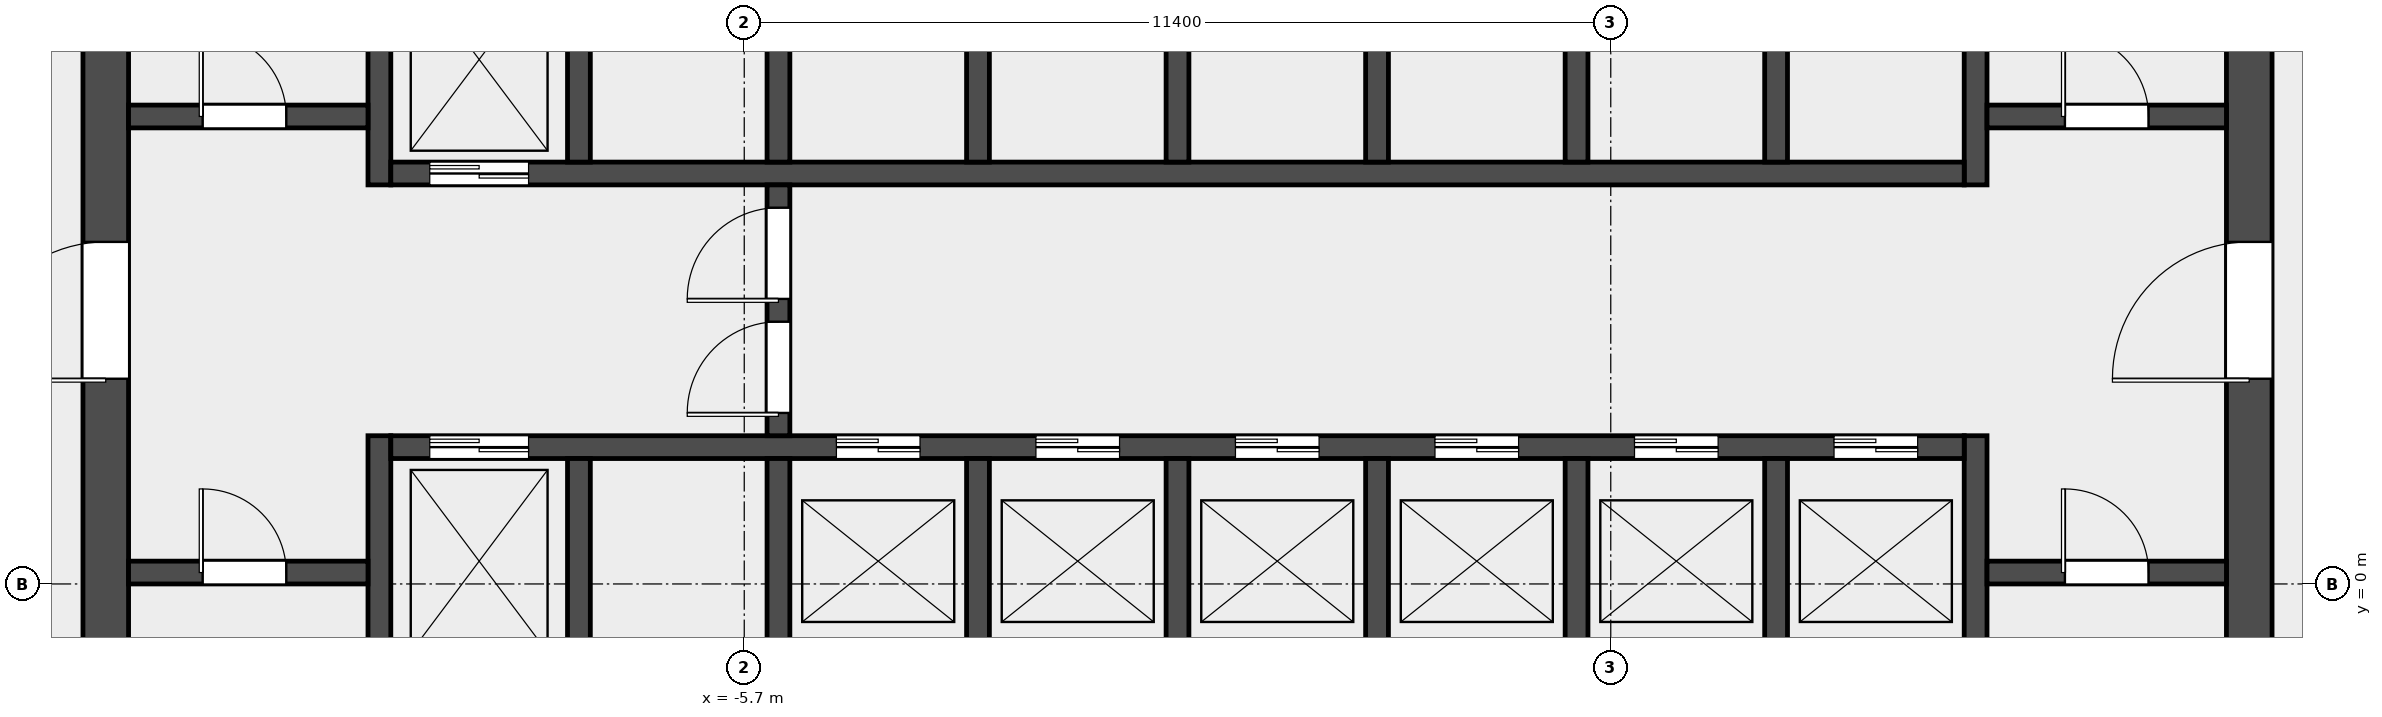
"""IFC4 building model, lengths in metres.
Left out: names, types, materials, properties, quantities, classifications, styles, units other than length and angle.
Written with IfcOpenShell. Run it as: python <this file> out.ifc"""

import sys

from ifc_helpers import new_model, si_unit, direction, frame, frame_2d, origin, place, context, subcontext, project, spatial, rectangle, extrude, element, fill, save


model = new_model("IFC4")
c1 = context("Model", 3, precision=1e-05, world=origin(), true_north=direction((0.0, 1.0)))
c2 = subcontext(c1, "Body", "Model", "MODEL_VIEW")
j1 = project(units=[si_unit("LENGTHUNIT", "METRE"), si_unit("PLANEANGLEUNIT", "RADIAN")], contexts=[c1])
p1 = place(None, origin())
s1 = spatial("IfcSite", under=j1, at=p1, CompositionType="ELEMENT")
p2 = place(p1, origin())
s2 = spatial("IfcBuilding", under=s1, at=p2, CompositionType="ELEMENT")
p3 = place(p2, frame((0.0, 0.0, 161.0)))
s3 = spatial("IfcBuildingStorey", under=s2, at=p3, CompositionType="ELEMENT", Elevation=161.0)
p4 = place(p3, frame((-14.1, -6.6, 0.0), z_axis=(0.0, 0.0, 1.0), x_axis=(0.0, 1.0, 0.0)))
e1 = element("IfcWall", 1, at=p4, inside=s3, PredefinedType="SHEAR", context=c2, shape_type="SweptSolid", body=[
    extrude(rectangle(XDim=19.5, YDim=0.6, at=frame_2d((9.75, 0.0))), origin(), (0.0, 0.0, 1.0), 3.7),
])
p5 = place(p4, frame((9.3, 0.0, 0.0)))
e2 = element("IfcOpeningElement", 2, at=p5, cuts=e1, PredefinedType="OPENING", context=c2, shape_type="SweptSolid", body=[
    extrude(rectangle(XDim=1.8, YDim=2.1, at=frame_2d((0.9, 1.05))), frame((0.0, 0.312, 0.0), z_axis=(0.0, -1.0, 0.0), x_axis=(1.0, 0.0, 0.0)), (0.0, 0.0, 1.0), 0.624),
])
p6 = place(p3, frame((14.1, -6.6, 0.0), z_axis=(0.0, 0.0, 1.0), x_axis=(0.0, 1.0, 0.0)))
e3 = element("IfcWall", 3, at=p6, inside=s3, PredefinedType="SHEAR", context=c2, shape_type="SweptSolid", body=[
    extrude(rectangle(XDim=19.5, YDim=0.6, at=frame_2d((9.75, 0.0))), origin(), (0.0, 0.0, 1.0), 3.7),
])
p7 = place(p6, frame((9.3, 0.0, 0.0)))
e4 = element("IfcOpeningElement", 4, at=p7, cuts=e3, PredefinedType="OPENING", context=c2, shape_type="SweptSolid", body=[
    extrude(rectangle(XDim=1.8, YDim=2.1, at=frame_2d((0.9, 1.05))), frame((0.0, 0.312, 0.0), z_axis=(0.0, -1.0, 0.0), x_axis=(1.0, 0.0, 0.0)), (0.0, 0.0, 1.0), 0.624),
])
p8 = place(p3, frame((-10.5, -6.6, 0.0), z_axis=(0.0, 0.0, 1.0), x_axis=(0.0, 1.0, 0.0)))
e5 = element("IfcWall", 5, at=p8, inside=s3, PredefinedType="SHEAR", context=c2, shape_type="SweptSolid", body=[
    extrude(rectangle(XDim=8.55, YDim=0.3, at=frame_2d((4.275, 0.0))), origin(), (0.0, 0.0, 1.0), 3.7),
])
p9 = place(p3, frame((-10.5, 5.25, 0.0), z_axis=(0.0, 0.0, 1.0), x_axis=(0.0, 1.0, 0.0)))
e6 = element("IfcWall", 6, at=p9, inside=s3, PredefinedType="SHEAR", context=c2, shape_type="SweptSolid", body=[
    extrude(rectangle(XDim=7.65, YDim=0.3, at=frame_2d((3.825, 0.0))), origin(), (0.0, 0.0, 1.0), 3.7),
])
p10 = place(p3, frame((10.5, -6.6, 0.0), z_axis=(0.0, 0.0, 1.0), x_axis=(0.0, 1.0, 0.0)))
e7 = element("IfcWall", 7, at=p10, inside=s3, PredefinedType="SHEAR", context=c2, shape_type="SweptSolid", body=[
    extrude(rectangle(XDim=8.55, YDim=0.3, at=frame_2d((4.275, 0.0))), origin(), (0.0, 0.0, 1.0), 3.7),
])
p11 = place(p3, frame((10.5, 5.25, 0.0), z_axis=(0.0, 0.0, 1.0), x_axis=(0.0, 1.0, 0.0)))
e8 = element("IfcWall", 8, at=p11, inside=s3, PredefinedType="SHEAR", context=c2, shape_type="SweptSolid", body=[
    extrude(rectangle(XDim=7.65, YDim=0.3, at=frame_2d((3.825, 0.0))), origin(), (0.0, 0.0, 1.0), 3.7),
])
p12 = place(p3, frame((-13.8, 0.15, 0.0), z_axis=(0.0, 0.0, 1.0), x_axis=(1.0, 0.0, 0.0)))
e9 = element("IfcWall", 9, at=p12, inside=s3, PredefinedType="SOLIDWALL", context=c2, shape_type="SweptSolid", body=[
    extrude(rectangle(XDim=3.15, YDim=0.3, at=frame_2d((1.575, 0.0))), origin(), (0.0, 0.0, 1.0), 3.7),
])
p13 = place(p12, frame((0.975, 0.0, 0.0)))
e10 = element("IfcOpeningElement", 10, at=p13, cuts=e9, PredefinedType="OPENING", context=c2, shape_type="SweptSolid", body=[
    extrude(rectangle(XDim=1.1, YDim=2.1, at=frame_2d((0.55, 1.05))), frame((0.0, 0.162, 0.0), z_axis=(0.0, -1.0, 0.0), x_axis=(1.0, 0.0, 0.0)), (0.0, 0.0, 1.0), 0.324),
])
p14 = place(p3, frame((-13.8, 6.15, 0.0), z_axis=(0.0, 0.0, 1.0), x_axis=(1.0, 0.0, 0.0)))
e11 = element("IfcWall", 11, at=p14, inside=s3, PredefinedType="SOLIDWALL", context=c2, shape_type="SweptSolid", body=[
    extrude(rectangle(XDim=3.15, YDim=0.3, at=frame_2d((1.575, 0.0))), origin(), (0.0, 0.0, 1.0), 3.7),
])
p15 = place(p14, frame((0.975, 0.0, 0.0)))
e12 = element("IfcOpeningElement", 12, at=p15, cuts=e11, PredefinedType="OPENING", context=c2, shape_type="SweptSolid", body=[
    extrude(rectangle(XDim=1.1, YDim=2.1, at=frame_2d((0.55, 1.05))), frame((0.0, 0.162, 0.0), z_axis=(0.0, -1.0, 0.0), x_axis=(1.0, 0.0, 0.0)), (0.0, 0.0, 1.0), 0.324),
])
p16 = place(p3, frame((10.65, 0.15, 0.0), z_axis=(0.0, 0.0, 1.0), x_axis=(1.0, 0.0, 0.0)))
e13 = element("IfcWall", 13, at=p16, inside=s3, PredefinedType="SOLIDWALL", context=c2, shape_type="SweptSolid", body=[
    extrude(rectangle(XDim=3.15, YDim=0.3, at=frame_2d((1.575, 0.0))), origin(), (0.0, 0.0, 1.0), 3.7),
])
p17 = place(p16, frame((1.025, 0.0, 0.0)))
e14 = element("IfcOpeningElement", 14, at=p17, cuts=e13, PredefinedType="OPENING", context=c2, shape_type="SweptSolid", body=[
    extrude(rectangle(XDim=1.1, YDim=2.1, at=frame_2d((0.55, 1.05))), frame((0.0, 0.162, 0.0), z_axis=(0.0, -1.0, 0.0), x_axis=(1.0, 0.0, 0.0)), (0.0, 0.0, 1.0), 0.324),
])
p18 = place(p3, frame((10.65, 6.15, 0.0), z_axis=(0.0, 0.0, 1.0), x_axis=(1.0, 0.0, 0.0)))
e15 = element("IfcWall", 15, at=p18, inside=s3, PredefinedType="SOLIDWALL", context=c2, shape_type="SweptSolid", body=[
    extrude(rectangle(XDim=3.15, YDim=0.3, at=frame_2d((1.575, 0.0))), origin(), (0.0, 0.0, 1.0), 3.7),
])
p19 = place(p18, frame((1.025, 0.0, 0.0)))
e16 = element("IfcOpeningElement", 16, at=p19, cuts=e15, PredefinedType="OPENING", context=c2, shape_type="SweptSolid", body=[
    extrude(rectangle(XDim=1.1, YDim=2.1, at=frame_2d((0.55, 1.05))), frame((0.0, 0.162, 0.0), z_axis=(0.0, -1.0, 0.0), x_axis=(1.0, 0.0, 0.0)), (0.0, 0.0, 1.0), 0.324),
])
p20 = place(p3, frame((-10.35, 1.8, 0.0), z_axis=(0.0, 0.0, 1.0), x_axis=(1.0, 0.0, 0.0)))
e17 = element("IfcWall", 17, at=p20, inside=s3, PredefinedType="SOLIDWALL", context=c2, shape_type="SweptSolid", body=[
    extrude(rectangle(XDim=20.7, YDim=0.3, at=frame_2d((10.35, 0.0))), origin(), (0.0, 0.0, 1.0), 3.7),
])
p21 = place(p20, frame((0.512, 0.0, 0.0)))
e18 = element("IfcOpeningElement", 18, at=p21, cuts=e17, PredefinedType="OPENING", context=c2, shape_type="SweptSolid", body=[
    extrude(rectangle(XDim=1.3, YDim=2.1, at=frame_2d((0.65, 1.05))), frame((0.0, 0.162, 0.0), z_axis=(0.0, -1.0, 0.0), x_axis=(1.0, 0.0, 0.0)), (0.0, 0.0, 1.0), 0.324),
])
p22 = place(p20, frame((5.863, 0.0, 0.0)))
e19 = element("IfcOpeningElement", 19, at=p22, cuts=e17, PredefinedType="OPENING", context=c2, shape_type="SweptSolid", body=[
    extrude(rectangle(XDim=1.1, YDim=2.1, at=frame_2d((0.55, 1.05))), frame((0.0, 0.162, 0.0), z_axis=(0.0, -1.0, 0.0), x_axis=(1.0, 0.0, 0.0)), (0.0, 0.0, 1.0), 0.324),
])
p23 = place(p20, frame((8.488, 0.0, 0.0)))
e20 = element("IfcOpeningElement", 20, at=p23, cuts=e17, PredefinedType="OPENING", context=c2, shape_type="SweptSolid", body=[
    extrude(rectangle(XDim=1.1, YDim=2.1, at=frame_2d((0.55, 1.05))), frame((0.0, 0.162, 0.0), z_axis=(0.0, -1.0, 0.0), x_axis=(1.0, 0.0, 0.0)), (0.0, 0.0, 1.0), 0.324),
])
p24 = place(p20, frame((11.113, 0.0, 0.0)))
e21 = element("IfcOpeningElement", 21, at=p24, cuts=e17, PredefinedType="OPENING", context=c2, shape_type="SweptSolid", body=[
    extrude(rectangle(XDim=1.1, YDim=2.1, at=frame_2d((0.55, 1.05))), frame((0.0, 0.162, 0.0), z_axis=(0.0, -1.0, 0.0), x_axis=(1.0, 0.0, 0.0)), (0.0, 0.0, 1.0), 0.324),
])
p25 = place(p20, frame((13.738, 0.0, 0.0)))
e22 = element("IfcOpeningElement", 22, at=p25, cuts=e17, PredefinedType="OPENING", context=c2, shape_type="SweptSolid", body=[
    extrude(rectangle(XDim=1.1, YDim=2.1, at=frame_2d((0.55, 1.05))), frame((0.0, 0.162, 0.0), z_axis=(0.0, -1.0, 0.0), x_axis=(1.0, 0.0, 0.0)), (0.0, 0.0, 1.0), 0.324),
])
p26 = place(p20, frame((16.363, 0.0, 0.0)))
e23 = element("IfcOpeningElement", 23, at=p26, cuts=e17, PredefinedType="OPENING", context=c2, shape_type="SweptSolid", body=[
    extrude(rectangle(XDim=1.1, YDim=2.1, at=frame_2d((0.55, 1.05))), frame((0.0, 0.162, 0.0), z_axis=(0.0, -1.0, 0.0), x_axis=(1.0, 0.0, 0.0)), (0.0, 0.0, 1.0), 0.324),
])
p27 = place(p20, frame((18.988, 0.0, 0.0)))
e24 = element("IfcOpeningElement", 24, at=p27, cuts=e17, PredefinedType="OPENING", context=c2, shape_type="SweptSolid", body=[
    extrude(rectangle(XDim=1.1, YDim=2.1, at=frame_2d((0.55, 1.05))), frame((0.0, 0.162, 0.0), z_axis=(0.0, -1.0, 0.0), x_axis=(1.0, 0.0, 0.0)), (0.0, 0.0, 1.0), 0.324),
])
p28 = place(p3, frame((-10.35, 5.4, 0.0), z_axis=(0.0, 0.0, 1.0), x_axis=(1.0, 0.0, 0.0)))
e25 = element("IfcWall", 25, at=p28, inside=s3, PredefinedType="SOLIDWALL", context=c2, shape_type="SweptSolid", body=[
    extrude(rectangle(XDim=20.7, YDim=0.3, at=frame_2d((10.35, 0.0))), origin(), (0.0, 0.0, 1.0), 3.7),
])
p29 = place(p28, frame((0.512, 0.0, 0.0)))
e26 = element("IfcOpeningElement", 26, at=p29, cuts=e25, PredefinedType="OPENING", context=c2, shape_type="SweptSolid", body=[
    extrude(rectangle(XDim=1.3, YDim=2.1, at=frame_2d((0.65, 1.05))), frame((0.0, 0.162, 0.0), z_axis=(0.0, -1.0, 0.0), x_axis=(1.0, 0.0, 0.0)), (0.0, 0.0, 1.0), 0.324),
])
for number, where, z_axis, x_axis in (
    (27, (-7.875, -1.05, 0.0), (0.0, 0.0, 1.0), (0.0, 1.0, 0.0)),
    (28, (-5.25, -1.05, 0.0), (0.0, 0.0, 1.0), (0.0, 1.0, 0.0)),
    (29, (-2.625, -1.05, 0.0), (0.0, 0.0, 1.0), (0.0, 1.0, 0.0)),
    (30, (0.0, -1.05, 0.0), (0.0, 0.0, 1.0), (0.0, 1.0, 0.0)),
    (31, (2.625, -1.05, 0.0), (0.0, 0.0, 1.0), (0.0, 1.0, 0.0)),
    (32, (5.25, -1.05, 0.0), (0.0, 0.0, 1.0), (0.0, 1.0, 0.0)),
    (33, (7.875, -1.05, 0.0), (0.0, 0.0, 1.0), (0.0, 1.0, 0.0)),
    (34, (-7.875, 5.55, 0.0), (0.0, 0.0, 1.0), (0.0, 1.0, 0.0)),
    (35, (-5.25, 5.55, 0.0), (0.0, 0.0, 1.0), (0.0, 1.0, 0.0)),
    (36, (-2.625, 5.55, 0.0), (0.0, 0.0, 1.0), (0.0, 1.0, 0.0)),
    (37, (0.0, 5.55, 0.0), (0.0, 0.0, 1.0), (0.0, 1.0, 0.0)),
    (38, (2.625, 5.55, 0.0), (0.0, 0.0, 1.0), (0.0, 1.0, 0.0)),
    (39, (5.25, 5.55, 0.0), (0.0, 0.0, 1.0), (0.0, 1.0, 0.0)),
    (40, (7.875, 5.55, 0.0), (0.0, 0.0, 1.0), (0.0, 1.0, 0.0)),
):
    element("IfcWall", number, at=place(p3, frame(where, z_axis=z_axis, x_axis=x_axis)), inside=s3, PredefinedType="SOLIDWALL", context=c2, shape_type="SweptSolid", body=[
        extrude(rectangle(XDim=2.7, YDim=0.3, at=frame_2d((1.35, 0.0))), origin(), (0.0, 0.0, 1.0), 3.7),
    ])
p30 = place(p3, frame((-5.25, 1.95, 0.0), z_axis=(0.0, 0.0, 1.0), x_axis=(0.0, 1.0, 0.0)))
e41 = element("IfcWall", 41, at=p30, inside=s3, PredefinedType="SOLIDWALL", context=c2, shape_type="SweptSolid", body=[
    extrude(rectangle(XDim=3.3, YDim=0.3, at=frame_2d((1.65, 0.0))), origin(), (0.0, 0.0, 1.0), 3.7),
])
p31 = place(p30, frame((0.3, 0.0, 0.0)))
e42 = element("IfcOpeningElement", 42, at=p31, cuts=e41, PredefinedType="OPENING", context=c2, shape_type="SweptSolid", body=[
    extrude(rectangle(XDim=1.2, YDim=2.1, at=frame_2d((0.6, 1.05))), frame((0.0, 0.162, 0.0), z_axis=(0.0, -1.0, 0.0), x_axis=(1.0, 0.0, 0.0)), (0.0, 0.0, 1.0), 0.324),
])
p32 = place(p30, frame((1.8, 0.0, 0.0)))
e43 = element("IfcOpeningElement", 43, at=p32, cuts=e41, PredefinedType="OPENING", context=c2, shape_type="SweptSolid", body=[
    extrude(rectangle(XDim=1.2, YDim=2.1, at=frame_2d((0.6, 1.05))), frame((0.0, 0.162, 0.0), z_axis=(0.0, -1.0, 0.0), x_axis=(1.0, 0.0, 0.0)), (0.0, 0.0, 1.0), 0.324),
])
p33 = place(p13, origin())
e44 = element("IfcDoor", 44, at=p33, inside=s3, OperationType="SINGLE_SWING_LEFT", PredefinedType="DOOR", context=c2, shape_type="SweptSolid", body=[
    extrude(rectangle(XDim=1.1, YDim=2.1, at=frame_2d((0.55, 1.05))), frame((0.0, 0.025, 0.0), z_axis=(0.0, -1.0, 0.0), x_axis=(1.0, 0.0, 0.0)), (0.0, 0.0, 1.0), 0.05),
])
fill(e10, e44)
p34 = place(p15, origin())
e45 = element("IfcDoor", 45, at=p34, inside=s3, OperationType="SINGLE_SWING_LEFT", PredefinedType="DOOR", context=c2, shape_type="SweptSolid", body=[
    extrude(rectangle(XDim=1.1, YDim=2.1, at=frame_2d((0.55, 1.05))), frame((0.0, 0.025, 0.0), z_axis=(0.0, -1.0, 0.0), x_axis=(1.0, 0.0, 0.0)), (0.0, 0.0, 1.0), 0.05),
])
fill(e12, e45)
p35 = place(p17, origin())
e46 = element("IfcDoor", 46, at=p35, inside=s3, OperationType="SINGLE_SWING_RIGHT", PredefinedType="DOOR", context=c2, shape_type="SweptSolid", body=[
    extrude(rectangle(XDim=1.1, YDim=2.1, at=frame_2d((0.55, 1.05))), frame((0.0, 0.025, 0.0), z_axis=(0.0, -1.0, 0.0), x_axis=(1.0, 0.0, 0.0)), (0.0, 0.0, 1.0), 0.05),
])
fill(e14, e46)
p36 = place(p19, origin())
e47 = element("IfcDoor", 47, at=p36, inside=s3, OperationType="SINGLE_SWING_RIGHT", PredefinedType="DOOR", context=c2, shape_type="SweptSolid", body=[
    extrude(rectangle(XDim=1.1, YDim=2.1, at=frame_2d((0.55, 1.05))), frame((0.0, 0.025, 0.0), z_axis=(0.0, -1.0, 0.0), x_axis=(1.0, 0.0, 0.0)), (0.0, 0.0, 1.0), 0.05),
])
fill(e16, e47)
p37 = place(p5, origin())
e48 = element("IfcDoor", 48, at=p37, inside=s3, OperationType="DOUBLE_DOOR_SINGLE_SWING", PredefinedType="DOOR", context=c2, shape_type="SweptSolid", body=[
    extrude(rectangle(XDim=1.8, YDim=2.1, at=frame_2d((0.9, 1.05))), frame((0.0, 0.025, 0.0), z_axis=(0.0, -1.0, 0.0), x_axis=(1.0, 0.0, 0.0)), (0.0, 0.0, 1.0), 0.05),
])
fill(e2, e48)
p38 = place(p7, origin())
e49 = element("IfcDoor", 49, at=p38, inside=s3, OperationType="DOUBLE_DOOR_SINGLE_SWING", PredefinedType="DOOR", context=c2, shape_type="SweptSolid", body=[
    extrude(rectangle(XDim=1.8, YDim=2.1, at=frame_2d((0.9, 1.05))), frame((0.0, 0.025, 0.0), z_axis=(0.0, -1.0, 0.0), x_axis=(1.0, 0.0, 0.0)), (0.0, 0.0, 1.0), 0.05),
])
fill(e4, e49)
p39 = place(p31, origin())
e50 = element("IfcDoor", 50, at=p39, inside=s3, OperationType="SINGLE_SWING_LEFT", PredefinedType="DOOR", context=c2, shape_type="SweptSolid", body=[
    extrude(rectangle(XDim=1.2, YDim=2.1, at=frame_2d((0.6, 1.05))), frame((0.0, 0.025, 0.0), z_axis=(0.0, -1.0, 0.0), x_axis=(1.0, 0.0, 0.0)), (0.0, 0.0, 1.0), 0.05),
])
fill(e42, e50)
p40 = place(p32, origin())
e51 = element("IfcDoor", 51, at=p40, inside=s3, OperationType="SINGLE_SWING_RIGHT", PredefinedType="DOOR", context=c2, shape_type="SweptSolid", body=[
    extrude(rectangle(XDim=1.2, YDim=2.1, at=frame_2d((0.6, 1.05))), frame((0.0, 0.025, 0.0), z_axis=(0.0, -1.0, 0.0), x_axis=(1.0, 0.0, 0.0)), (0.0, 0.0, 1.0), 0.05),
])
fill(e43, e51)
p41 = place(p21, origin())
e52 = element("IfcDoor", 52, at=p41, inside=s3, OperationType="DOUBLE_DOOR_SLIDING", PredefinedType="DOOR", context=c2, shape_type="SweptSolid", body=[
    extrude(rectangle(XDim=1.3, YDim=2.1, at=frame_2d((0.65, 1.05))), frame((0.0, 0.025, 0.0), z_axis=(0.0, -1.0, 0.0), x_axis=(1.0, 0.0, 0.0)), (0.0, 0.0, 1.0), 0.05),
])
fill(e18, e52)
p42 = place(p22, origin())
e53 = element("IfcDoor", 53, at=p42, inside=s3, OperationType="DOUBLE_DOOR_SLIDING", PredefinedType="DOOR", context=c2, shape_type="SweptSolid", body=[
    extrude(rectangle(XDim=1.1, YDim=2.1, at=frame_2d((0.55, 1.05))), frame((0.0, 0.025, 0.0), z_axis=(0.0, -1.0, 0.0), x_axis=(1.0, 0.0, 0.0)), (0.0, 0.0, 1.0), 0.05),
])
fill(e19, e53)
p43 = place(p23, origin())
e54 = element("IfcDoor", 54, at=p43, inside=s3, OperationType="DOUBLE_DOOR_SLIDING", PredefinedType="DOOR", context=c2, shape_type="SweptSolid", body=[
    extrude(rectangle(XDim=1.1, YDim=2.1, at=frame_2d((0.55, 1.05))), frame((0.0, 0.025, 0.0), z_axis=(0.0, -1.0, 0.0), x_axis=(1.0, 0.0, 0.0)), (0.0, 0.0, 1.0), 0.05),
])
fill(e20, e54)
p44 = place(p24, origin())
e55 = element("IfcDoor", 55, at=p44, inside=s3, OperationType="DOUBLE_DOOR_SLIDING", PredefinedType="DOOR", context=c2, shape_type="SweptSolid", body=[
    extrude(rectangle(XDim=1.1, YDim=2.1, at=frame_2d((0.55, 1.05))), frame((0.0, 0.025, 0.0), z_axis=(0.0, -1.0, 0.0), x_axis=(1.0, 0.0, 0.0)), (0.0, 0.0, 1.0), 0.05),
])
fill(e21, e55)
p45 = place(p25, origin())
e56 = element("IfcDoor", 56, at=p45, inside=s3, OperationType="DOUBLE_DOOR_SLIDING", PredefinedType="DOOR", context=c2, shape_type="SweptSolid", body=[
    extrude(rectangle(XDim=1.1, YDim=2.1, at=frame_2d((0.55, 1.05))), frame((0.0, 0.025, 0.0), z_axis=(0.0, -1.0, 0.0), x_axis=(1.0, 0.0, 0.0)), (0.0, 0.0, 1.0), 0.05),
])
fill(e22, e56)
p46 = place(p26, origin())
e57 = element("IfcDoor", 57, at=p46, inside=s3, OperationType="DOUBLE_DOOR_SLIDING", PredefinedType="DOOR", context=c2, shape_type="SweptSolid", body=[
    extrude(rectangle(XDim=1.1, YDim=2.1, at=frame_2d((0.55, 1.05))), frame((0.0, 0.025, 0.0), z_axis=(0.0, -1.0, 0.0), x_axis=(1.0, 0.0, 0.0)), (0.0, 0.0, 1.0), 0.05),
])
fill(e23, e57)
p47 = place(p27, origin())
e58 = element("IfcDoor", 58, at=p47, inside=s3, OperationType="DOUBLE_DOOR_SLIDING", PredefinedType="DOOR", context=c2, shape_type="SweptSolid", body=[
    extrude(rectangle(XDim=1.1, YDim=2.1, at=frame_2d((0.55, 1.05))), frame((0.0, 0.025, 0.0), z_axis=(0.0, -1.0, 0.0), x_axis=(1.0, 0.0, 0.0)), (0.0, 0.0, 1.0), 0.05),
])
fill(e24, e58)
p48 = place(p29, origin())
e59 = element("IfcDoor", 59, at=p48, inside=s3, OperationType="DOUBLE_DOOR_SLIDING", PredefinedType="DOOR", context=c2, shape_type="SweptSolid", body=[
    extrude(rectangle(XDim=1.3, YDim=2.1, at=frame_2d((0.65, 1.05))), frame((0.0, 0.025, 0.0), z_axis=(0.0, -1.0, 0.0), x_axis=(1.0, 0.0, 0.0)), (0.0, 0.0, 1.0), 0.05),
])
fill(e26, e59)
save(model, sys.argv[1])
